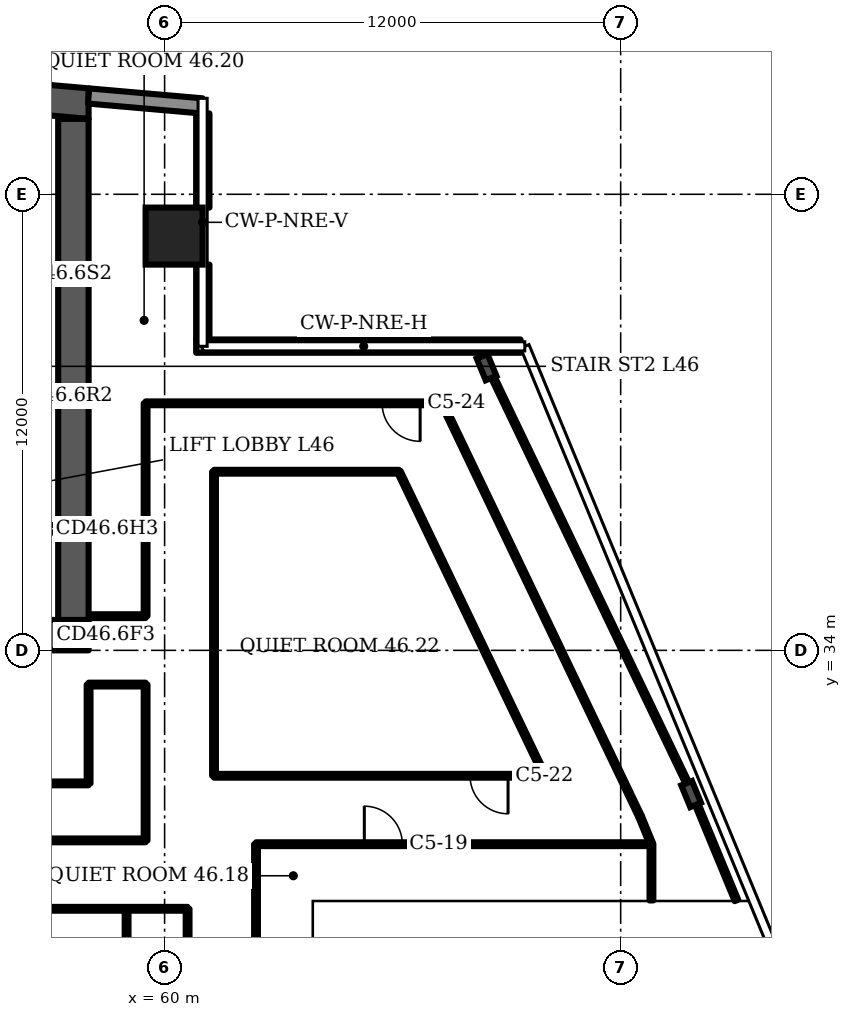
"""IFC4 building model, lengths in metres.
Left out: names, types, materials, properties, quantities, classifications, styles, units other than length and angle.
Written with IfcOpenShell. Run it as: python <this file> out.ifc"""

import sys

from ifc_helpers import new_model, si_unit, direction, frame, frame_2d, origin, origin_2d, place, context, subcontext, project, spatial, polyline, rectangle, i_section, outline, extrude, element, fill, save


model = new_model("IFC4")
c1 = context("Model", 3, precision=1e-05, world=origin(), true_north=direction((0.0, 1.0)))
c2 = subcontext(c1, "Body", "Model", "MODEL_VIEW")
j1 = project(units=[si_unit("LENGTHUNIT", "METRE"), si_unit("PLANEANGLEUNIT", "RADIAN")], contexts=[c1])
p1 = place(None, origin())
s1 = spatial("IfcSite", under=j1, at=p1, CompositionType="ELEMENT")
p2 = place(p1, origin())
s2 = spatial("IfcBuilding", under=s1, at=p2, CompositionType="ELEMENT")
p3 = place(p2, frame((0.0, 0.0, 187.9)))
s3 = spatial("IfcBuildingStorey", under=s2, at=p3, CompositionType="ELEMENT", Elevation=187.9)
p4 = place(p3, origin())
e1 = element("IfcWall", 1, at=p4, inside=s3, PredefinedType="SHEAR", context=c2, shape_type="SweptSolid", body=[
    extrude(outline(polyline([(16.0, 47.984), (37.0, 49.822), (58.0, 47.984), (58.0, 48.787), (37.0, 50.625), (16.0, 48.787), (16.0, 47.984)])), origin(), (0.0, 0.0, 1.0), 3.6),
])
p5 = place(p3, frame((16.0, 34.4, 0.0), z_axis=(0.0, 0.0, 1.0), x_axis=(1.0, 0.0, 0.0)))
e2 = element("IfcWall", 2, at=p5, inside=s3, PredefinedType="SHEAR", context=c2, shape_type="SweptSolid", body=[
    extrude(rectangle(XDim=42.0, YDim=0.8, at=frame_2d((21.0, 0.0))), origin(), (0.0, 0.0, 1.0), 3.6),
])
p6 = place(p5, frame((3.2, 0.0, 0.0)))
e3 = element("IfcOpeningElement", 3, at=p6, cuts=e2, PredefinedType="OPENING", context=c2, shape_type="SweptSolid", body=[
    extrude(rectangle(XDim=1.0, YDim=2.1, at=frame_2d((0.5, 1.05))), frame((0.0, 0.41, 0.0), z_axis=(0.0, -1.0, 0.0), x_axis=(1.0, 0.0, 0.0)), (0.0, 0.0, 1.0), 0.82),
])
p7 = place(p5, frame((7.65, 0.0, 0.0)))
e4 = element("IfcOpeningElement", 4, at=p7, cuts=e2, PredefinedType="OPENING", context=c2, shape_type="SweptSolid", body=[
    extrude(rectangle(XDim=1.2, YDim=2.1, at=frame_2d((0.6, 1.05))), frame((0.0, 0.41, 0.0), z_axis=(0.0, -1.0, 0.0), x_axis=(1.0, 0.0, 0.0)), (0.0, 0.0, 1.0), 0.82),
])
p8 = place(p5, frame((14.767, 0.0, 0.0)))
e5 = element("IfcOpeningElement", 5, at=p8, cuts=e2, PredefinedType="OPENING", context=c2, shape_type="SweptSolid", body=[
    extrude(rectangle(XDim=1.1, YDim=2.1, at=frame_2d((0.55, 1.05))), frame((0.0, 0.41, 0.0), z_axis=(0.0, -1.0, 0.0), x_axis=(1.0, 0.0, 0.0)), (0.0, 0.0, 1.0), 0.82),
])
p9 = place(p5, frame((19.133, 0.0, 0.0)))
e6 = element("IfcOpeningElement", 6, at=p9, cuts=e2, PredefinedType="OPENING", context=c2, shape_type="SweptSolid", body=[
    extrude(rectangle(XDim=1.1, YDim=2.1, at=frame_2d((0.55, 1.05))), frame((0.0, 0.41, 0.0), z_axis=(0.0, -1.0, 0.0), x_axis=(1.0, 0.0, 0.0)), (0.0, 0.0, 1.0), 0.82),
])
p10 = place(p5, frame((16.8, 0.0, 0.0)))
e7 = element("IfcOpeningElement", 7, at=p10, cuts=e2, PredefinedType="OPENING", context=c2, shape_type="SweptSolid", body=[
    extrude(rectangle(XDim=1.4, YDim=2.1, at=frame_2d((0.7, 1.05))), frame((0.0, 0.41, 0.0), z_axis=(0.0, -1.0, 0.0), x_axis=(1.0, 0.0, 0.0)), (0.0, 0.0, 1.0), 0.82),
])
p11 = place(p5, frame((21.767, 0.0, 0.0)))
e8 = element("IfcOpeningElement", 8, at=p11, cuts=e2, PredefinedType="OPENING", context=c2, shape_type="SweptSolid", body=[
    extrude(rectangle(XDim=1.1, YDim=2.1, at=frame_2d((0.55, 1.05))), frame((0.0, 0.41, 0.0), z_axis=(0.0, -1.0, 0.0), x_axis=(1.0, 0.0, 0.0)), (0.0, 0.0, 1.0), 0.82),
])
p12 = place(p5, frame((23.95, 0.0, 0.0)))
e9 = element("IfcOpeningElement", 9, at=p12, cuts=e2, PredefinedType="OPENING", context=c2, shape_type="SweptSolid", body=[
    extrude(rectangle(XDim=1.1, YDim=2.1, at=frame_2d((0.55, 1.05))), frame((0.0, 0.41, 0.0), z_axis=(0.0, -1.0, 0.0), x_axis=(1.0, 0.0, 0.0)), (0.0, 0.0, 1.0), 0.82),
])
p13 = place(p5, frame((26.133, 0.0, 0.0)))
e10 = element("IfcOpeningElement", 10, at=p13, cuts=e2, PredefinedType="OPENING", context=c2, shape_type="SweptSolid", body=[
    extrude(rectangle(XDim=1.1, YDim=2.1, at=frame_2d((0.55, 1.05))), frame((0.0, 0.41, 0.0), z_axis=(0.0, -1.0, 0.0), x_axis=(1.0, 0.0, 0.0)), (0.0, 0.0, 1.0), 0.82),
])
p14 = place(p5, frame((33.15, 0.0, 0.0)))
e11 = element("IfcOpeningElement", 11, at=p14, cuts=e2, PredefinedType="OPENING", context=c2, shape_type="SweptSolid", body=[
    extrude(rectangle(XDim=1.2, YDim=2.1, at=frame_2d((0.6, 1.05))), frame((0.0, 0.41, 0.0), z_axis=(0.0, -1.0, 0.0), x_axis=(1.0, 0.0, 0.0)), (0.0, 0.0, 1.0), 0.82),
])
p15 = place(p5, frame((35.817, 0.0, 0.0)))
e12 = element("IfcOpeningElement", 12, at=p15, cuts=e2, PredefinedType="OPENING", context=c2, shape_type="SweptSolid", body=[
    extrude(rectangle(XDim=1.0, YDim=2.1, at=frame_2d((0.5, 1.05))), frame((0.0, 0.41, 0.0), z_axis=(0.0, -1.0, 0.0), x_axis=(1.0, 0.0, 0.0)), (0.0, 0.0, 1.0), 0.82),
])
p16 = place(p5, frame((39.95, 0.0, 0.0)))
e13 = element("IfcOpeningElement", 13, at=p16, cuts=e2, PredefinedType="OPENING", context=c2, shape_type="SweptSolid", body=[
    extrude(rectangle(XDim=1.0, YDim=2.1, at=frame_2d((0.5, 1.05))), frame((0.0, 0.41, 0.0), z_axis=(0.0, -1.0, 0.0), x_axis=(1.0, 0.0, 0.0)), (0.0, 0.0, 1.0), 0.82),
])
p17 = place(p5, frame((37.767, 0.0, 0.0)))
e14 = element("IfcOpeningElement", 14, at=p17, cuts=e2, PredefinedType="OPENING", context=c2, shape_type="SweptSolid", body=[
    extrude(rectangle(XDim=1.4, YDim=2.1, at=frame_2d((0.7, 1.05))), frame((0.0, 0.41, 0.0), z_axis=(0.0, -1.0, 0.0), x_axis=(1.0, 0.0, 0.0)), (0.0, 0.0, 1.0), 0.82),
])
p18 = place(p3, frame((57.6, 34.8, 0.0), z_axis=(0.0, 0.0, 1.0), x_axis=(0.0, 1.0, 0.0)))
e15 = element("IfcWall", 15, at=p18, inside=s3, PredefinedType="SHEAR", context=c2, shape_type="SweptSolid", body=[
    extrude(rectangle(XDim=13.184, YDim=0.8, at=frame_2d((6.592, 0.0))), origin(), (0.0, 0.0, 1.0), 3.6),
])
p19 = place(p3, frame((60.25, 44.9, 0.0), z_axis=(0.0, 0.0, 1.0), x_axis=(1.0, 0.0, 0.0)))
e16 = element("IfcColumn", 16, at=p19, inside=s3, PredefinedType="COLUMN", context=c2, shape_type="SweptSolid", body=[
    extrude(rectangle(XDim=1.5, YDim=1.5, at=origin_2d()), origin(), (0.0, 0.0, 1.0), 3.6),
])
for number, where, z_axis, x_axis in (
    (17, (73.854, 30.219, 0.0), (0.0, 0.0, 1.0), (0.924, 0.382, 0.0)),
    (18, (68.472, 41.45, 0.0), (0.0, 0.0, 1.0), (0.924, 0.382, 0.0)),
):
    element("IfcColumn", number, at=place(p3, frame(where, z_axis=z_axis, x_axis=x_axis)), inside=s3, PredefinedType="COLUMN", context=c2, shape_type="SweptSolid", body=[
        extrude(i_section(OverallWidth=0.305, OverallDepth=0.62, WebThickness=0.021, FlangeThickness=0.04, FilletRadius=0.027, at=origin_2d()), origin(), (0.0, 0.0, 1.0), 3.6),
    ])
p20 = place(p3, frame((60.983, 48.326, 0.0), z_axis=(0.0, 0.0, 1.0), x_axis=(-0.996194, 0.087168, 0.0)))
e19 = element("IfcWall", 19, at=p20, inside=s3, PredefinedType="SOLIDWALL", context=c2, shape_type="SweptSolid", body=[
    extrude(rectangle(XDim=2.994, YDim=0.4, at=frame_2d((1.497, 0.0))), origin(), (0.0, 0.0, 1.0), 3.2),
])
p21 = place(p3, frame((69.366, 42.005, 0.0), z_axis=(0.0, 0.0, 1.0), x_axis=(-1.0, 0.0, 0.0)))
e20 = element("IfcWall", 20, at=p21, inside=s3, PredefinedType="SOLIDWALL", context=c2, shape_type="SweptSolid", body=[
    extrude(rectangle(XDim=8.536, YDim=0.35, at=frame_2d((4.268, 0.0))), origin(), (0.0, 0.0, 1.0), 1.0),
])
p22 = place(p3, frame((61.005, 42.18, 0.0), z_axis=(0.0, 0.0, 1.0), x_axis=(0.0, 1.0, 0.0)))
e21 = element("IfcWall", 21, at=p22, inside=s3, PredefinedType="SOLIDWALL", context=c2, shape_type="SweptSolid", body=[
    extrude(rectangle(XDim=1.97, YDim=0.35, at=frame_2d((0.985, 0.0))), origin(), (0.0, 0.0, 1.0), 1.0),
])
p23 = place(p3, frame((61.005, 45.65, 0.0), z_axis=(0.0, 0.0, 1.0), x_axis=(0.0, 1.0, 0.0)))
e22 = element("IfcWall", 22, at=p23, inside=s3, PredefinedType="SOLIDWALL", context=c2, shape_type="SweptSolid", body=[
    extrude(rectangle(XDim=2.477, YDim=0.35, at=frame_2d((1.238, 0.0))), origin(), (0.0, 0.0, 1.0), 1.0),
])
p24 = place(p3, frame((55.7, 37.2, 0.0), z_axis=(0.0, 0.0, 1.0), x_axis=(1.0, 0.0, 0.0)))
e23 = element("IfcWall", 23, at=p24, inside=s3, PredefinedType="PARTITIONING", context=c2, shape_type="SweptSolid", body=[
    extrude(rectangle(XDim=1.5, YDim=0.2, at=frame_2d((0.75, 0.0))), origin(), (0.0, 0.0, 1.0), 3.2),
])
p25 = place(p24, frame((0.25, 0.0, 0.0)))
e24 = element("IfcOpeningElement", 24, at=p25, cuts=e23, PredefinedType="OPENING", context=c2, shape_type="SweptSolid", body=[
    extrude(rectangle(XDim=1.0, YDim=2.1, at=frame_2d((0.5, 1.05))), frame((0.0, 0.11, 0.0), z_axis=(0.0, -1.0, 0.0), x_axis=(1.0, 0.0, 0.0)), (0.0, 0.0, 1.0), 0.22),
])
p26 = place(p3, frame((51.4, 40.7, 0.0), z_axis=(0.0, 0.0, 1.0), x_axis=(1.0, 0.0, 0.0)))
e25 = element("IfcWall", 25, at=p26, inside=s3, PredefinedType="PARTITIONING", context=c2, shape_type="SweptSolid", body=[
    extrude(rectangle(XDim=5.8, YDim=0.2, at=frame_2d((2.9, 0.0))), origin(), (0.0, 0.0, 1.0), 3.2),
])
p27 = place(p26, frame((0.367, 0.0, 0.0)))
e26 = element("IfcOpeningElement", 26, at=p27, cuts=e25, PredefinedType="OPENING", context=c2, shape_type="SweptSolid", body=[
    extrude(rectangle(XDim=1.1, YDim=2.1, at=frame_2d((0.55, 1.05))), frame((0.0, 0.11, 0.0), z_axis=(0.0, -1.0, 0.0), x_axis=(1.0, 0.0, 0.0)), (0.0, 0.0, 1.0), 0.22),
])
p28 = place(p26, frame((3.417, 0.0, 0.0)))
e27 = element("IfcOpeningElement", 27, at=p28, cuts=e25, PredefinedType="OPENING", context=c2, shape_type="SweptSolid", body=[
    extrude(rectangle(XDim=1.0, YDim=2.1, at=frame_2d((0.5, 1.05))), frame((0.0, 0.11, 0.0), z_axis=(0.0, -1.0, 0.0), x_axis=(1.0, 0.0, 0.0)), (0.0, 0.0, 1.0), 0.22),
])
p29 = place(p3, frame((51.4, 43.9, 0.0), z_axis=(0.0, 0.0, 1.0), x_axis=(1.0, 0.0, 0.0)))
e28 = element("IfcWall", 28, at=p29, inside=s3, PredefinedType="PARTITIONING", context=c2, shape_type="SweptSolid", body=[
    extrude(rectangle(XDim=5.8, YDim=0.2, at=frame_2d((2.9, 0.0))), origin(), (0.0, 0.0, 1.0), 3.2),
])
p30 = place(p29, frame((3.417, 0.0, 0.0)))
e29 = element("IfcOpeningElement", 29, at=p30, cuts=e28, PredefinedType="OPENING", context=c2, shape_type="SweptSolid", body=[
    extrude(rectangle(XDim=1.0, YDim=2.1, at=frame_2d((0.5, 1.05))), frame((0.0, 0.11, 0.0), z_axis=(0.0, -1.0, 0.0), x_axis=(1.0, 0.0, 0.0)), (0.0, 0.0, 1.0), 0.22),
])
p31 = place(p3, frame((18.635, 29.0, 0.0), z_axis=(0.0, 0.0, 1.0), x_axis=(1.0, 0.0, 0.0)))
e30 = element("IfcWall", 30, at=p31, inside=s3, PredefinedType="PARTITIONING", context=c2, shape_type="SweptSolid", body=[
    extrude(rectangle(XDim=40.865, YDim=0.1, at=frame_2d((20.433, 0.0))), origin(), (0.0, 0.0, 1.0), 3.2),
])
p32 = place(p31, frame((30.545, 0.0, 0.0)))
e31 = element("IfcOpeningElement", 31, at=p32, cuts=e30, PredefinedType="OPENING", context=c2, shape_type="SweptSolid", body=[
    extrude(rectangle(XDim=1.0, YDim=2.1, at=frame_2d((0.5, 1.05))), frame((0.0, 0.06, 0.0), z_axis=(0.0, -1.0, 0.0), x_axis=(1.0, 0.0, 0.0)), (0.0, 0.0, 1.0), 0.12),
])
p33 = place(p3, frame((19.3, 27.2, 0.0), z_axis=(0.0, 0.0, 1.0), x_axis=(1.0, 0.0, 0.0)))
e32 = element("IfcWall", 32, at=p33, inside=s3, PredefinedType="PARTITIONING", context=c2, shape_type="SweptSolid", body=[
    extrude(rectangle(XDim=41.305, YDim=0.1, at=frame_2d((20.652, 0.0))), origin(), (0.0, 0.0, 1.0), 3.2),
])
p34 = place(p33, frame((32.32, 0.0, 0.0)))
e33 = element("IfcOpeningElement", 33, at=p34, cuts=e32, PredefinedType="OPENING", context=c2, shape_type="SweptSolid", body=[
    extrude(rectangle(XDim=1.8, YDim=2.1, at=frame_2d((0.9, 1.05))), frame((0.0, 0.06, 0.0), z_axis=(0.0, -1.0, 0.0), x_axis=(1.0, 0.0, 0.0)), (0.0, 0.0, 1.0), 0.12),
])
p35 = place(p3, frame((58.0, 30.5, 0.0), z_axis=(0.0, 0.0, 1.0), x_axis=(0.0, 1.0, 0.0)))
e34 = element("IfcWall", 34, at=p35, inside=s3, PredefinedType="PARTITIONING", context=c2, shape_type="SweptSolid", body=[
    extrude(rectangle(XDim=2.6, YDim=0.1, at=frame_2d((1.3, 0.0))), origin(), (0.0, 0.0, 1.0), 3.2),
])
p36 = place(p3, frame((58.0, 33.1, 0.0), z_axis=(0.0, 0.0, 1.0), x_axis=(1.0, 0.0, 0.0)))
e35 = element("IfcWall", 35, at=p36, inside=s3, PredefinedType="PARTITIONING", context=c2, shape_type="SweptSolid", body=[
    extrude(rectangle(XDim=1.5, YDim=0.1, at=frame_2d((0.75, 0.0))), origin(), (0.0, 0.0, 1.0), 3.2),
])
p37 = place(p3, frame((58.02, 34.9, 0.0), z_axis=(0.0, 0.0, 1.0), x_axis=(1.0, 0.0, 0.0)))
e36 = element("IfcWall", 36, at=p37, inside=s3, PredefinedType="PARTITIONING", context=c2, shape_type="SweptSolid", body=[
    extrude(rectangle(XDim=1.48, YDim=0.1, at=frame_2d((0.74, 0.0))), origin(), (0.0, 0.0, 1.0), 3.2),
])
p38 = place(p3, frame((59.0, 13.625, 0.0), z_axis=(0.0, 0.0, 1.0), x_axis=(0.0, 1.0, 0.0)))
e37 = element("IfcWall", 37, at=p38, inside=s3, PredefinedType="PARTITIONING", context=c2, shape_type="SweptSolid", body=[
    extrude(rectangle(XDim=13.575, YDim=0.1, at=frame_2d((6.788, 0.0))), origin(), (0.0, 0.0, 1.0), 3.2),
])
p39 = place(p3, frame((59.5, 29.0, 0.0), z_axis=(0.0, 0.0, 1.0), x_axis=(0.0, 1.0, 0.0)))
e38 = element("IfcWall", 38, at=p39, inside=s3, PredefinedType="PARTITIONING", context=c2, shape_type="SweptSolid", body=[
    extrude(rectangle(XDim=4.1, YDim=0.1, at=frame_2d((2.05, 0.0))), origin(), (0.0, 0.0, 1.0), 3.2),
])
p40 = place(p3, frame((59.5, 34.9, 0.0), z_axis=(0.0, 0.0, 1.0), x_axis=(0.0, 1.0, 0.0)))
e39 = element("IfcWall", 39, at=p40, inside=s3, PredefinedType="PARTITIONING", context=c2, shape_type="SweptSolid", body=[
    extrude(rectangle(XDim=5.6, YDim=0.1, at=frame_2d((2.8, 0.0))), origin(), (0.0, 0.0, 1.0), 3.2),
])
p41 = place(p3, frame((59.5, 40.5, 0.0), z_axis=(0.0, 0.0, 1.0), x_axis=(1.0, 0.0, 0.0)))
e40 = element("IfcWall", 40, at=p41, inside=s3, PredefinedType="PARTITIONING", context=c2, shape_type="SweptSolid", body=[
    extrude(rectangle(XDim=7.8, YDim=0.1, at=frame_2d((3.9, 0.0))), origin(), (0.0, 0.0, 1.0), 3.2),
])
p42 = place(p41, frame((6.223, 0.0, 0.0)))
e41 = element("IfcOpeningElement", 41, at=p42, cuts=e40, PredefinedType="OPENING", context=c2, shape_type="SweptSolid", body=[
    extrude(rectangle(XDim=1.0, YDim=2.1, at=frame_2d((0.5, 1.05))), frame((0.0, 0.06, 0.0), z_axis=(0.0, -1.0, 0.0), x_axis=(1.0, 0.0, 0.0)), (0.0, 0.0, 1.0), 0.12),
])
p43 = place(p3, frame((60.605, 17.1, 0.0), z_axis=(0.0, 0.0, 1.0), x_axis=(0.0, 1.0, 0.0)))
e42 = element("IfcWall", 42, at=p43, inside=s3, PredefinedType="PARTITIONING", context=c2, shape_type="SweptSolid", body=[
    extrude(rectangle(XDim=10.1, YDim=0.1, at=frame_2d((5.05, 0.0))), origin(), (0.0, 0.0, 1.0), 3.2),
])
p44 = place(p3, frame((61.3, 30.7, 0.0), z_axis=(0.0, 0.0, 1.0), x_axis=(0.0, 1.0, 0.0)))
e43 = element("IfcWall", 43, at=p44, inside=s3, PredefinedType="PARTITIONING", context=c2, shape_type="SweptSolid", body=[
    extrude(rectangle(XDim=8.0, YDim=0.1, at=frame_2d((4.0, 0.0))), origin(), (0.0, 0.0, 1.0), 3.2),
])
p45 = place(p3, frame((61.3, 30.7, 0.0), z_axis=(0.0, 0.0, 1.0), x_axis=(1.0, 0.0, 0.0)))
e44 = element("IfcWall", 44, at=p45, inside=s3, PredefinedType="PARTITIONING", context=c2, shape_type="SweptSolid", body=[
    extrude(rectangle(XDim=8.7, YDim=0.1, at=frame_2d((4.35, 0.0))), origin(), (0.0, 0.0, 1.0), 3.2),
])
p46 = place(p45, frame((6.737, 0.0, 0.0)))
e45 = element("IfcOpeningElement", 45, at=p46, cuts=e44, PredefinedType="OPENING", context=c2, shape_type="SweptSolid", body=[
    extrude(rectangle(XDim=1.0, YDim=2.1, at=frame_2d((0.5, 1.05))), frame((0.0, 0.06, 0.0), z_axis=(0.0, -1.0, 0.0), x_axis=(1.0, 0.0, 0.0)), (0.0, 0.0, 1.0), 0.12),
])
p47 = place(p3, frame((61.3, 38.7, 0.0), z_axis=(0.0, 0.0, 1.0), x_axis=(1.0, 0.0, 0.0)))
e46 = element("IfcWall", 46, at=p47, inside=s3, PredefinedType="PARTITIONING", context=c2, shape_type="SweptSolid", body=[
    extrude(rectangle(XDim=4.865, YDim=0.1, at=frame_2d((2.433, 0.0))), origin(), (0.0, 0.0, 1.0), 3.2),
])
p48 = place(p3, frame((62.405, 25.05, 0.0), z_axis=(0.0, 0.0, 1.0), x_axis=(0.0, 1.0, 0.0)))
e47 = element("IfcWall", 47, at=p48, inside=s3, PredefinedType="PARTITIONING", context=c2, shape_type="SweptSolid", body=[
    extrude(rectangle(XDim=3.85, YDim=0.1, at=frame_2d((1.925, 0.0))), origin(), (0.0, 0.0, 1.0), 3.2),
])
p49 = place(p3, frame((62.405, 28.9, 0.0), z_axis=(0.0, 0.0, 1.0), x_axis=(1.0, 0.0, 0.0)))
e48 = element("IfcWall", 48, at=p49, inside=s3, PredefinedType="PARTITIONING", context=c2, shape_type="SweptSolid", body=[
    extrude(rectangle(XDim=10.405, YDim=0.1, at=frame_2d((5.203, 0.0))), origin(), (0.0, 0.0, 1.0), 3.2),
])
p50 = place(p49, frame((2.85, 0.0, 0.0)))
e49 = element("IfcOpeningElement", 49, at=p50, cuts=e48, PredefinedType="OPENING", context=c2, shape_type="SweptSolid", body=[
    extrude(rectangle(XDim=1.0, YDim=2.1, at=frame_2d((0.5, 1.05))), frame((0.0, 0.06, 0.0), z_axis=(0.0, -1.0, 0.0), x_axis=(1.0, 0.0, 0.0)), (0.0, 0.0, 1.0), 0.12),
])
p51 = place(p3, frame((70.0, 30.7, 0.0), z_axis=(0.0, 0.0, 1.0), x_axis=(-0.432271, 0.901748, 0.0)))
e50 = element("IfcWall", 50, at=p51, inside=s3, PredefinedType="PARTITIONING", context=c2, shape_type="SweptSolid", body=[
    extrude(rectangle(XDim=8.872, YDim=0.1, at=frame_2d((4.436, 0.0))), origin(), (0.0, 0.0, 1.0), 3.2),
])
p52 = place(p3, frame((72.515, 29.62, 0.0), z_axis=(0.0, 0.0, 1.0), x_axis=(-0.43171, 0.902012, 0.0)))
e51 = element("IfcWall", 51, at=p52, inside=s3, PredefinedType="PARTITIONING", context=c2, shape_type="SweptSolid", body=[
    extrude(rectangle(XDim=12.007, YDim=0.1, at=frame_2d((6.003, 0.0))), origin(), (0.0, 0.0, 1.0), 3.2),
])
p53 = place(p3, frame((72.81, 28.9, 0.0), z_axis=(0.0, 0.0, 1.0), x_axis=(-0.379219, 0.925307, 0.0)))
e52 = element("IfcWall", 52, at=p53, inside=s3, PredefinedType="PARTITIONING", context=c2, shape_type="SweptSolid", body=[
    extrude(rectangle(XDim=0.778, YDim=0.1, at=frame_2d((0.389, 0.0))), origin(), (0.0, 0.0, 1.0), 3.2),
])
p54 = place(p3, frame((72.81, 27.42, 0.0), z_axis=(0.0, 0.0, 1.0), x_axis=(0.0, 1.0, 0.0)))
e53 = element("IfcWall", 53, at=p54, inside=s3, PredefinedType="PARTITIONING", context=c2, shape_type="SweptSolid", body=[
    extrude(rectangle(XDim=1.48, YDim=0.1, at=frame_2d((0.74, 0.0))), origin(), (0.0, 0.0, 1.0), 3.2),
])
p55 = place(p3, frame((73.885, 30.23, 0.0), z_axis=(0.0, 0.0, 1.0), x_axis=(-0.432032, 0.901863, 0.0)))
e54 = element("IfcWall", 54, at=p55, inside=s3, PredefinedType="PARTITIONING", context=c2, shape_type="SweptSolid", body=[
    extrude(rectangle(XDim=13.015, YDim=0.1, at=frame_2d((6.507, 0.0))), origin(), (0.0, 0.0, 1.0), 2.58),
])
p56 = place(p3, frame((75.047, 27.42, 0.0), z_axis=(0.0, 0.0, 1.0), x_axis=(-0.382024, 0.924148, 0.0)))
e55 = element("IfcWall", 55, at=p56, inside=s3, PredefinedType="PARTITIONING", context=c2, shape_type="SweptSolid", body=[
    extrude(rectangle(XDim=3.041, YDim=0.1, at=frame_2d((1.521, 0.0))), origin(), (0.0, 0.0, 1.0), 2.58),
])
p57 = place(p3, frame((44.15, 30.5, 0.0), z_axis=(0.0, 0.0, 1.0), x_axis=(1.0, 0.0, 0.0)))
e56 = element("IfcWall", 56, at=p57, inside=s3, PredefinedType="PARTITIONING", context=c2, shape_type="SweptSolid", body=[
    extrude(rectangle(XDim=13.85, YDim=0.1, at=frame_2d((6.925, 0.0))), origin(), (0.0, 0.0, 1.0), 3.2),
])
p58 = place(p50, origin())
e57 = element("IfcDoor", 57, at=p58, inside=s3, OperationType="SINGLE_SWING_LEFT", PredefinedType="DOOR", context=c2, shape_type="SweptSolid", body=[
    extrude(rectangle(XDim=1.0, YDim=2.1, at=frame_2d((0.5, 1.05))), frame((0.0, 0.025, 0.0), z_axis=(0.0, -1.0, 0.0), x_axis=(1.0, 0.0, 0.0)), (0.0, 0.0, 1.0), 0.05),
])
fill(e49, e57)
p59 = place(p46, origin())
e58 = element("IfcDoor", 58, at=p59, inside=s3, OperationType="SINGLE_SWING_RIGHT", PredefinedType="DOOR", context=c2, shape_type="SweptSolid", body=[
    extrude(rectangle(XDim=1.0, YDim=2.1, at=frame_2d((0.5, 1.05))), frame((0.0, 0.025, 0.0), z_axis=(0.0, -1.0, 0.0), x_axis=(1.0, 0.0, 0.0)), (0.0, 0.0, 1.0), 0.05),
])
fill(e45, e58)
p60 = place(p42, origin())
e59 = element("IfcDoor", 59, at=p60, inside=s3, OperationType="SINGLE_SWING_RIGHT", PredefinedType="DOOR", context=c2, shape_type="SweptSolid", body=[
    extrude(rectangle(XDim=1.0, YDim=2.1, at=frame_2d((0.5, 1.05))), frame((0.0, 0.025, 0.0), z_axis=(0.0, -1.0, 0.0), x_axis=(1.0, 0.0, 0.0)), (0.0, 0.0, 1.0), 0.05),
])
fill(e41, e59)
save(model, sys.argv[1])
